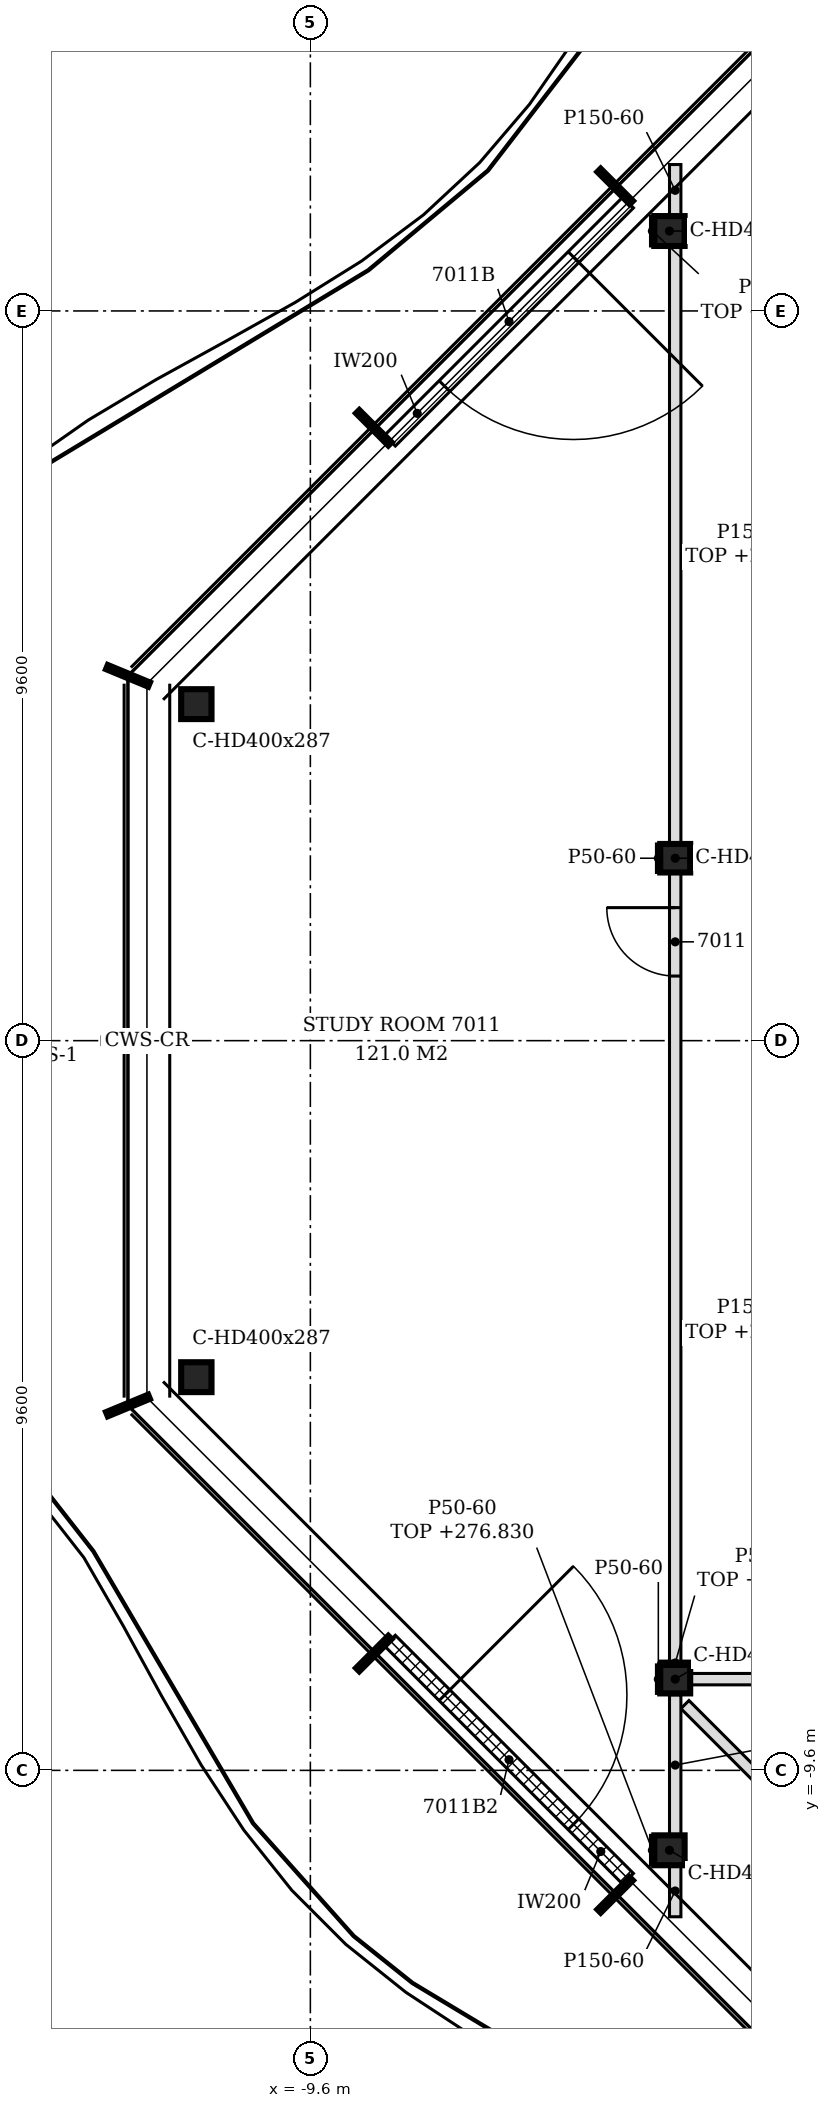
"""IFC4 building model, lengths in metres.
Left out: names, types, materials, properties, quantities, classifications, styles, units other than length and angle.
Written with IfcOpenShell. Run it as: python <this file> out.ifc"""

import sys

from ifc_helpers import new_model, si_unit, direction, frame, frame_2d, origin, origin_2d, place, context, subcontext, project, spatial, polyline, rectangle, i_section, outline, extrude, element, fill, save


model = new_model("IFC4")
c1 = context("Model", 3, precision=1e-05, world=origin(), true_north=direction((0.0, 1.0)))
c2 = subcontext(c1, "Body", "Model", "MODEL_VIEW")
j1 = project(units=[si_unit("LENGTHUNIT", "METRE"), si_unit("PLANEANGLEUNIT", "RADIAN")], contexts=[c1])
p1 = place(None, origin())
s1 = spatial("IfcSite", under=j1, at=p1, CompositionType="ELEMENT")
p2 = place(p1, origin())
s2 = spatial("IfcBuilding", under=s1, at=p2, CompositionType="ELEMENT")
p3 = place(p2, frame((0.0, 0.0, 274.2)))
s3 = spatial("IfcBuildingStorey", under=s2, at=p3, CompositionType="ELEMENT", Elevation=274.2)
for number, where, z_axis, x_axis in (
    (1, (-4.876, 10.652, -0.15), (0.0, 0.0, 1.0), (1.0, 0.0, 0.0)),
    (2, (-11.1, 4.427, -0.15), (0.0, 0.0, 1.0), (1.0, 0.0, 0.0)),
    (3, (-11.1, -4.427, -0.15), (0.0, 0.0, 1.0), (1.0, 0.0, 0.0)),
    (4, (-4.876, -10.652, -0.15), (0.0, 0.0, 1.0), (1.0, 0.0, 0.0)),
):
    element("IfcColumn", number, at=place(p3, frame(where, z_axis=z_axis, x_axis=x_axis)), inside=s3, PredefinedType="COLUMN", context=c2, shape_type="SweptSolid", body=[
        extrude(i_section(OverallWidth=0.399, OverallDepth=0.393, WebThickness=0.023, FlangeThickness=0.037, FilletRadius=0.015, at=origin_2d()), origin(), (0.0, 0.0, 1.0), 3.6),
    ])
for number, where, z_axis, x_axis in (
    (5, (-4.8, -8.4, -0.15), (0.0, 0.0, 1.0), (1.0, 0.0, 0.0)),
    (6, (-4.8, 2.4, -0.15), (0.0, 0.0, 1.0), (1.0, 0.0, 0.0)),
):
    element("IfcColumn", number, at=place(p3, frame(where, z_axis=z_axis, x_axis=x_axis)), inside=s3, PredefinedType="COLUMN", context=c2, shape_type="SweptSolid", body=[
        extrude(i_section(OverallWidth=0.394, OverallDepth=0.375, WebThickness=0.017, FlangeThickness=0.028, FilletRadius=0.015, at=origin_2d()), origin(), (0.0, 0.0, 1.0), 3.6),
    ])
p4 = place(p3, frame((-5.42, 11.026, 0.0), z_axis=(0.0, 0.0, 1.0), x_axis=(-0.707134329907, -0.707079231393, 0.0)))
e7 = element("IfcWall", 7, at=p4, inside=s3, PredefinedType="NOTDEFINED", context=c2, shape_type="SweptSolid", body=[
    extrude(rectangle(XDim=4.431, YDim=0.2, at=frame_2d((2.215, 0.0))), origin(), (0.0, 0.0, 1.0), 3.45),
])
p5 = place(p4, frame((1.015, 0.0, 0.0)))
e8 = element("IfcOpeningElement", 8, at=p5, cuts=e7, PredefinedType="OPENING", context=c2, shape_type="SweptSolid", body=[
    extrude(rectangle(XDim=2.4, YDim=2.4, at=frame_2d((1.2, 1.2))), frame((0.0, 0.11, 0.0), z_axis=(0.0, -1.0, 0.0), x_axis=(1.0, 0.0, 0.0)), (0.0, 0.0, 1.0), 0.22),
])
p6 = place(p3, frame((-8.553, -7.893, 0.0), z_axis=(0.0, 0.0, 1.0), x_axis=(0.707134329907, -0.707079231393, 0.0)))
e9 = element("IfcWall", 9, at=p6, inside=s3, PredefinedType="NOTDEFINED", context=c2, shape_type="SweptSolid", body=[
    extrude(rectangle(XDim=4.431, YDim=0.2, at=frame_2d((2.215, 0.0))), origin(), (0.0, 0.0, 1.0), 3.45),
])
p7 = place(p6, frame((1.015, 0.0, 0.0)))
e10 = element("IfcOpeningElement", 10, at=p7, cuts=e9, PredefinedType="OPENING", context=c2, shape_type="SweptSolid", body=[
    extrude(rectangle(XDim=2.4, YDim=2.4, at=frame_2d((1.2, 1.2))), frame((0.0, 0.11, 0.0), z_axis=(0.0, -1.0, 0.0), x_axis=(1.0, 0.0, 0.0)), (0.0, 0.0, 1.0), 0.22),
])
p8 = place(p3, frame((2.066, -15.472, 0.0), z_axis=(0.0, 0.0, 1.0), x_axis=(-0.707106781187, 0.707106781187, 0.0)))
e11 = element("IfcWall", 11, at=p8, inside=s3, PredefinedType="PARTITIONING", context=c2, shape_type="SweptSolid", body=[
    extrude(rectangle(XDim=9.529, YDim=0.15, at=frame_2d((4.765, 0.0))), origin(), (0.0, 0.0, 1.0), 2.98),
])
p9 = place(p3, frame((-4.8, -11.526, 0.0), z_axis=(0.0, 0.0, 1.0), x_axis=(0.0, 1.0, 0.0)))
e12 = element("IfcWall", 12, at=p9, inside=s3, PredefinedType="PARTITIONING", context=c2, shape_type="SweptSolid", body=[
    extrude(outline(polyline([(0.0, 0.0), (0.678, 0.0), (0.678, 2.63), (0.229, 2.63), (0.227, 3.45), (0.0, 3.45), (0.0, 0.0)])), frame((0.0, 0.075, 0.0), z_axis=(0.0, -1.0, 0.0), x_axis=(1.0, 0.0, 0.0)), (0.0, 0.0, 1.0), 0.15),
])
p10 = place(p3, frame((-4.8, -10.455, 0.0), z_axis=(0.0, 0.0, 1.0), x_axis=(0.0, 1.0, 0.0)))
e13 = element("IfcWall", 13, at=p10, inside=s3, PredefinedType="PARTITIONING", context=c2, shape_type="SweptSolid", body=[
    extrude(outline(polyline([(0.0, 0.0), (1.849, 0.0), (1.849, 3.03), (0.298, 3.03), (0.296, 2.63), (0.058, 2.63), (0.056, 3.03), (0.0, 3.03), (0.0, 0.0)])), frame((0.0, 0.075, 0.0), z_axis=(0.0, -1.0, 0.0), x_axis=(1.0, 0.0, 0.0)), (0.0, 0.0, 1.0), 0.15),
])
p11 = place(p3, frame((-4.603, -8.4, 0.0), z_axis=(0.0, 0.0, 1.0), x_axis=(1.0, 0.0, 0.0)))
e14 = element("IfcWall", 14, at=p11, inside=s3, PredefinedType="PARTITIONING", context=c2, shape_type="SweptSolid", body=[
    extrude(rectangle(XDim=9.478, YDim=0.15, at=frame_2d((4.739, 0.0))), origin(), (0.0, 0.0, 1.0), 2.83),
])
p12 = place(p11, frame((4.153, 0.0, 0.0)))
e15 = element("IfcOpeningElement", 15, at=p12, cuts=e14, PredefinedType="OPENING", context=c2, shape_type="SweptSolid", body=[
    extrude(rectangle(XDim=0.9, YDim=2.1, at=frame_2d((0.45, 1.05))), frame((0.0, 0.085, 0.0), z_axis=(0.0, -1.0, 0.0), x_axis=(1.0, 0.0, 0.0)), (0.0, 0.0, 1.0), 0.17),
])
p13 = place(p3, frame((-4.8, -8.212, 0.0), z_axis=(0.0, 0.0, 1.0), x_axis=(0.0, 1.0, 0.0)))
e16 = element("IfcWall", 16, at=p13, inside=s3, PredefinedType="PARTITIONING", context=c2, shape_type="SweptSolid", body=[
    extrude(rectangle(XDim=10.425, YDim=0.15, at=frame_2d((5.212, 0.0))), origin(), (0.0, 0.0, 1.0), 2.83),
])
p14 = place(p13, frame((9.062, 0.0, 0.0)))
e17 = element("IfcOpeningElement", 17, at=p14, cuts=e16, PredefinedType="OPENING", context=c2, shape_type="SweptSolid", body=[
    extrude(rectangle(XDim=0.9, YDim=2.1, at=frame_2d((0.45, 1.05))), frame((0.0, 0.085, 0.0), z_axis=(0.0, -1.0, 0.0), x_axis=(1.0, 0.0, 0.0)), (0.0, 0.0, 1.0), 0.17),
])
p15 = place(p3, frame((-4.8, 2.587, 0.0), z_axis=(0.0, 0.0, 1.0), x_axis=(0.0, 1.0, 0.0)))
e18 = element("IfcWall", 18, at=p15, inside=s3, PredefinedType="PARTITIONING", context=c2, shape_type="SweptSolid", body=[
    extrude(outline(polyline([(0.0, 0.0), (7.868, 0.0), (7.867, 2.93), (7.809, 2.93), (7.807, 2.63), (7.57, 2.63), (7.568, 2.93), (0.0, 2.93), (0.0, 0.0)])), frame((0.0, 0.075, 0.0), z_axis=(0.0, -1.0, 0.0), x_axis=(1.0, 0.0, 0.0)), (0.0, 0.0, 1.0), 0.15),
])
p16 = place(p3, frame((-4.8, 10.848, 0.0), z_axis=(0.0, 0.0, 1.0), x_axis=(0.0, 1.0, 0.0)))
e19 = element("IfcWall", 19, at=p16, inside=s3, PredefinedType="PARTITIONING", context=c2, shape_type="SweptSolid", body=[
    extrude(outline(polyline([(0.0, 0.0), (0.678, 0.0), (0.678, 3.45), (0.449, 3.45), (0.447, 2.63), (0.0, 2.63), (0.0, 0.0)])), frame((0.0, 0.075, 0.0), z_axis=(0.0, -1.0, 0.0), x_axis=(1.0, 0.0, 0.0)), (0.0, 0.0, 1.0), 0.15),
])
p17 = place(p3, frame((-5.1, -10.848, 0.0), z_axis=(0.0, 0.0, 1.0), x_axis=(0.0, 1.0, 0.0)))
e20 = element("IfcWall", 20, at=p17, inside=s3, PredefinedType="PARTITIONING", context=c2, shape_type="SweptSolid", body=[
    extrude(rectangle(XDim=0.393, YDim=0.05, at=frame_2d((0.196, 0.0))), origin(), (0.0, 0.0, 1.0), 2.63),
])
for number, where, z_axis, x_axis in (
    (21, (-5.022, -8.587, 0.0), (0.0, 0.0, 1.0), (0.0, 1.0, 0.0)),
    (22, (-5.022, 2.212, 0.0), (0.0, 0.0, 1.0), (0.0, 1.0, 0.0)),
):
    element("IfcWall", number, at=place(p3, frame(where, z_axis=z_axis, x_axis=x_axis)), inside=s3, PredefinedType="PARTITIONING", context=c2, shape_type="SweptSolid", body=[
        extrude(rectangle(XDim=0.375, YDim=0.05, at=frame_2d((0.188, 0.0))), origin(), (0.0, 0.0, 1.0), 3.45),
    ])
p18 = place(p3, frame((-5.1, 10.455, 0.0), z_axis=(0.0, 0.0, 1.0), x_axis=(0.0, 1.0, 0.0)))
e23 = element("IfcWall", 23, at=p18, inside=s3, PredefinedType="PARTITIONING", context=c2, shape_type="SweptSolid", body=[
    extrude(rectangle(XDim=0.393, YDim=0.05, at=frame_2d((0.196, 0.0))), origin(), (0.0, 0.0, 1.0), 2.63),
])
p19 = place(p3, frame((-4.997, -8.188, 0.0), z_axis=(0.0, 0.0, 1.0), x_axis=(1.0, 0.0, 0.0)))
e24 = element("IfcWall", 24, at=p19, inside=s3, PredefinedType="PARTITIONING", context=c2, shape_type="SweptSolid", body=[
    extrude(rectangle(XDim=0.394, YDim=0.05, at=frame_2d((0.197, 0.0))), origin(), (0.0, 0.0, 1.0), 2.83),
])
p20 = place(p5, origin())
e25 = element("IfcDoor", 25, at=p20, inside=s3, OperationType="SINGLE_SWING_LEFT", PredefinedType="DOOR", context=c2, shape_type="SweptSolid", body=[
    extrude(rectangle(XDim=2.4, YDim=2.4, at=frame_2d((1.2, 1.2))), frame((0.0, 0.025, 0.0), z_axis=(0.0, -1.0, 0.0), x_axis=(1.0, 0.0, 0.0)), (0.0, 0.0, 1.0), 0.05),
])
fill(e8, e25)
p21 = place(p7, origin())
e26 = element("IfcDoor", 26, at=p21, inside=s3, OperationType="SINGLE_SWING_LEFT", PredefinedType="DOOR", context=c2, shape_type="SweptSolid", body=[
    extrude(rectangle(XDim=2.4, YDim=2.4, at=frame_2d((1.2, 1.2))), frame((0.0, 0.025, 0.0), z_axis=(0.0, -1.0, 0.0), x_axis=(1.0, 0.0, 0.0)), (0.0, 0.0, 1.0), 0.05),
])
fill(e10, e26)
p22 = place(p14, origin())
e27 = element("IfcDoor", 27, at=p22, inside=s3, OperationType="SINGLE_SWING_RIGHT", PredefinedType="DOOR", context=c2, shape_type="SweptSolid", body=[
    extrude(rectangle(XDim=0.9, YDim=2.1, at=frame_2d((0.45, 1.05))), frame((0.0, 0.025, 0.0), z_axis=(0.0, -1.0, 0.0), x_axis=(1.0, 0.0, 0.0)), (0.0, 0.0, 1.0), 0.05),
])
fill(e17, e27)
save(model, sys.argv[1])
